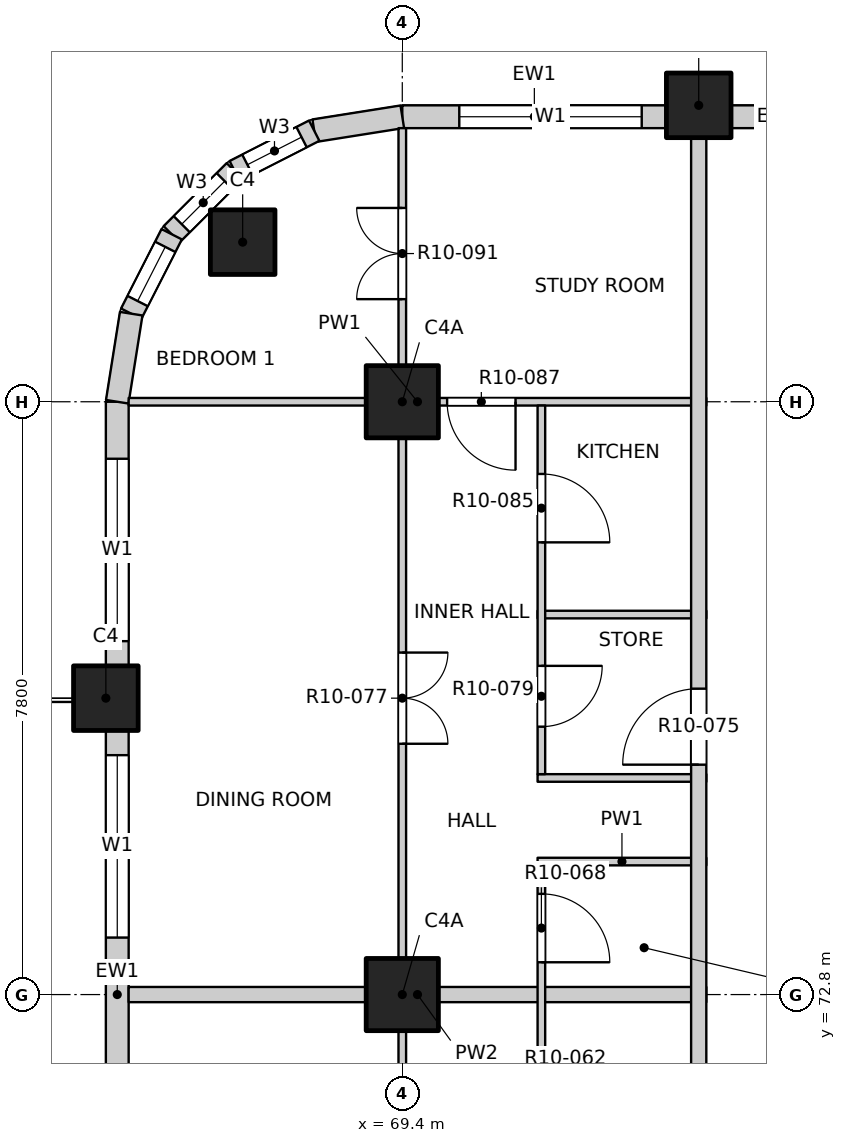
"""IFC4 building model, lengths in metres.
Left out: names, types, materials, properties, quantities, classifications, styles, units other than length and angle.
Written with IfcOpenShell. Run it as: python <this file> out.ifc"""

import sys

from ifc_helpers import new_model, si_unit, direction, frame, frame_2d, origin, origin_2d, place, context, subcontext, project, spatial, rectangle, extrude, element, fill, save


model = new_model("IFC4")
c1 = context("Model", 3, precision=1e-05, world=origin(), true_north=direction((0.0, 1.0)))
c2 = subcontext(c1, "Body", "Model", "MODEL_VIEW")
j1 = project(units=[si_unit("LENGTHUNIT", "METRE"), si_unit("PLANEANGLEUNIT", "RADIAN")], contexts=[c1])
p1 = place(None, origin())
s1 = spatial("IfcSite", under=j1, at=p1, CompositionType="ELEMENT")
p2 = place(p1, origin())
s2 = spatial("IfcBuilding", under=s1, at=p2, CompositionType="ELEMENT")
p3 = place(p2, frame((0.0, 0.0, 123.7)))
s3 = spatial("IfcBuildingStorey", under=s2, at=p3, CompositionType="ELEMENT", Elevation=123.7)
for number, where, z_axis, x_axis in (
    (1, (67.3, 82.7, -0.3), (0.0, 0.0, 1.0), (1.0, 0.0, 0.0)),
    (2, (73.3, 84.5, -0.3), (0.0, 0.0, 1.0), (1.0, 0.0, 0.0)),
    (3, (65.5, 76.7, -0.3), (0.0, 0.0, 1.0), (1.0, 0.0, 0.0)),
):
    element("IfcColumn", number, at=place(p3, frame(where, z_axis=z_axis, x_axis=x_axis)), inside=s3, PredefinedType="COLUMN", context=c2, shape_type="SweptSolid", body=[
        extrude(rectangle(XDim=0.85, YDim=0.85, at=origin_2d()), origin(), (0.0, 0.0, 1.0), 3.45),
    ])
for number, where, z_axis, x_axis in (
    (4, (69.4, 72.8, -0.3), (0.0, 0.0, 1.0), (1.0, 0.0, 0.0)),
    (5, (69.4, 80.6, -0.3), (0.0, 0.0, 1.0), (1.0, 0.0, 0.0)),
):
    element("IfcColumn", number, at=place(p3, frame(where, z_axis=z_axis, x_axis=x_axis)), inside=s3, PredefinedType="COLUMN", context=c2, shape_type="SweptSolid", body=[
        extrude(rectangle(XDim=0.95, YDim=0.95, at=origin_2d()), origin(), (0.0, 0.0, 1.0), 3.45),
    ])
p4 = place(p3, frame((69.4, 84.35, 0.0), z_axis=(0.0, 0.0, 1.0), x_axis=(1.0, 0.0, 0.0)))
e6 = element("IfcWall", 6, at=p4, inside=s3, PredefinedType="SOLIDWALL", context=c2, shape_type="SweptSolid", body=[
    extrude(rectangle(XDim=3.475, YDim=0.3, at=frame_2d((1.738, 0.0))), origin(), (0.0, 0.0, 1.0), 2.7),
])
p5 = place(p4, frame((0.75, 0.0, 0.9)))
e7 = element("IfcOpeningElement", 7, at=p5, cuts=e6, PredefinedType="OPENING", context=c2, shape_type="SweptSolid", body=[
    extrude(rectangle(XDim=2.4, YDim=1.8, at=frame_2d((1.2, 0.9))), frame((0.0, 0.16, 0.0), z_axis=(0.0, -1.0, 0.0), x_axis=(1.0, 0.0, 0.0)), (0.0, 0.0, 1.0), 0.32),
])
p6 = place(p3, frame((73.725, 84.35, 0.0), z_axis=(0.0, 0.0, 1.0), x_axis=(1.0, 0.0, 0.0)))
e8 = element("IfcWall", 8, at=p6, inside=s3, PredefinedType="SOLIDWALL", context=c2, shape_type="SweptSolid", body=[
    extrude(rectangle(XDim=1.25, YDim=0.3, at=frame_2d((0.625, 0.0))), origin(), (0.0, 0.0, 1.0), 2.7),
])
p7 = place(p3, frame((65.65, 69.325, 0.0), z_axis=(0.0, 0.0, 1.0), x_axis=(0.0, 1.0, 0.0)))
e9 = element("IfcWall", 9, at=p7, inside=s3, PredefinedType="SOLIDWALL", context=c2, shape_type="SweptSolid", body=[
    extrude(rectangle(XDim=6.95, YDim=0.3, at=frame_2d((3.475, 0.0))), origin(), (0.0, 0.0, 1.0), 2.7),
])
p8 = place(p7, frame((0.625, 0.0, 0.0)))
e10 = element("IfcOpeningElement", 10, at=p8, cuts=e9, PredefinedType="OPENING", context=c2, shape_type="SweptSolid", body=[
    extrude(rectangle(XDim=1.8, YDim=2.4, at=frame_2d((0.9, 1.2))), frame((0.0, 0.16, 0.0), z_axis=(0.0, -1.0, 0.0), x_axis=(1.0, 0.0, 0.0)), (0.0, 0.0, 1.0), 0.32),
])
p9 = place(p7, frame((4.225, 0.0, 0.9)))
e11 = element("IfcOpeningElement", 11, at=p9, cuts=e9, PredefinedType="OPENING", context=c2, shape_type="SweptSolid", body=[
    extrude(rectangle(XDim=2.4, YDim=1.8, at=frame_2d((1.2, 0.9))), frame((0.0, 0.16, 0.0), z_axis=(0.0, -1.0, 0.0), x_axis=(1.0, 0.0, 0.0)), (0.0, 0.0, 1.0), 0.32),
])
p10 = place(p3, frame((65.65, 77.125, 0.0), z_axis=(0.0, 0.0, 1.0), x_axis=(0.0, 1.0, 0.0)))
e12 = element("IfcWall", 12, at=p10, inside=s3, PredefinedType="SOLIDWALL", context=c2, shape_type="SweptSolid", body=[
    extrude(rectangle(XDim=3.475, YDim=0.3, at=frame_2d((1.738, 0.0))), origin(), (0.0, 0.0, 1.0), 2.7),
])
p11 = place(p10, frame((0.325, 0.0, 0.9)))
e13 = element("IfcOpeningElement", 13, at=p11, cuts=e12, PredefinedType="OPENING", context=c2, shape_type="SweptSolid", body=[
    extrude(rectangle(XDim=2.4, YDim=1.8, at=frame_2d((1.2, 0.9))), frame((0.0, 0.16, 0.0), z_axis=(0.0, -1.0, 0.0), x_axis=(1.0, 0.0, 0.0)), (0.0, 0.0, 1.0), 0.32),
])
p12 = place(p3, frame((69.4, 84.35, 0.0), z_axis=(0.0, 0.0, 1.0), x_axis=(-0.987678452879, -0.156496880861, 0.0)))
e14 = element("IfcWall", 14, at=p12, inside=s3, PredefinedType="SOLIDWALL", context=c2, shape_type="SweptSolid", body=[
    extrude(rectangle(XDim=1.173, YDim=0.3, at=frame_2d((0.586, 0.0))), origin(), (0.0, 0.0, 1.0), 2.7),
])
p13 = place(p3, frame((68.241, 84.167, 0.0), z_axis=(0.0, 0.0, 1.0), x_axis=(-0.890988677504, -0.454025524128, 0.0)))
e15 = element("IfcWall", 15, at=p13, inside=s3, PredefinedType="SOLIDWALL", context=c2, shape_type="SweptSolid", body=[
    extrude(rectangle(XDim=1.173, YDim=0.3, at=frame_2d((0.587, 0.0))), origin(), (0.0, 0.0, 1.0), 2.7),
])
p14 = place(p13, frame((0.187, 0.0, 0.9)))
e16 = element("IfcOpeningElement", 16, at=p14, cuts=e15, PredefinedType="OPENING", context=c2, shape_type="SweptSolid", body=[
    extrude(rectangle(XDim=0.8, YDim=1.2, at=frame_2d((0.4, 0.6))), frame((0.0, 0.16, 0.0), z_axis=(0.0, -1.0, 0.0), x_axis=(1.0, 0.0, 0.0)), (0.0, 0.0, 1.0), 0.32),
])
p15 = place(p3, frame((67.196, 83.634, 0.0), z_axis=(0.0, 0.0, 1.0), x_axis=(-0.707106781187, -0.707106781187, 0.0)))
e17 = element("IfcWall", 17, at=p15, inside=s3, PredefinedType="SOLIDWALL", context=c2, shape_type="SweptSolid", body=[
    extrude(rectangle(XDim=1.173, YDim=0.3, at=frame_2d((0.586, 0.0))), origin(), (0.0, 0.0, 1.0), 2.7),
])
p16 = place(p15, frame((0.187, 0.0, 0.9)))
e18 = element("IfcOpeningElement", 18, at=p16, cuts=e17, PredefinedType="OPENING", context=c2, shape_type="SweptSolid", body=[
    extrude(rectangle(XDim=0.8, YDim=1.2, at=frame_2d((0.4, 0.6))), frame((0.0, 0.16, 0.0), z_axis=(0.0, -1.0, 0.0), x_axis=(1.0, 0.0, 0.0)), (0.0, 0.0, 1.0), 0.32),
])
p17 = place(p3, frame((66.366, 82.804, 0.0), z_axis=(0.0, 0.0, 1.0), x_axis=(-0.454025524128, -0.890988677504, 0.0)))
e19 = element("IfcWall", 19, at=p17, inside=s3, PredefinedType="SOLIDWALL", context=c2, shape_type="SweptSolid", body=[
    extrude(rectangle(XDim=1.173, YDim=0.3, at=frame_2d((0.587, 0.0))), origin(), (0.0, 0.0, 1.0), 2.7),
])
p18 = place(p17, frame((0.187, 0.0, 0.9)))
e20 = element("IfcOpeningElement", 20, at=p18, cuts=e19, PredefinedType="OPENING", context=c2, shape_type="SweptSolid", body=[
    extrude(rectangle(XDim=0.8, YDim=1.2, at=frame_2d((0.4, 0.6))), frame((0.0, 0.16, 0.0), z_axis=(0.0, -1.0, 0.0), x_axis=(1.0, 0.0, 0.0)), (0.0, 0.0, 1.0), 0.32),
])
p19 = place(p3, frame((65.833, 81.759, 0.0), z_axis=(0.0, 0.0, 1.0), x_axis=(-0.156496880861, -0.987678452879, 0.0)))
e21 = element("IfcWall", 21, at=p19, inside=s3, PredefinedType="SOLIDWALL", context=c2, shape_type="SweptSolid", body=[
    extrude(rectangle(XDim=1.173, YDim=0.3, at=frame_2d((0.586, 0.0))), origin(), (0.0, 0.0, 1.0), 2.7),
])
p20 = place(p3, frame((65.8, 72.8, 0.0), z_axis=(0.0, 0.0, 1.0), x_axis=(1.0, 0.0, 0.0)))
e22 = element("IfcWall", 22, at=p20, inside=s3, PredefinedType="PARTITIONING", context=c2, shape_type="SweptSolid", body=[
    extrude(rectangle(XDim=7.6, YDim=0.2, at=frame_2d((3.8, 0.0))), origin(), (0.0, 0.0, 1.0), 3.15),
])
for number, where, z_axis, x_axis in (
    (23, (71.18, 74.55, 0.0), (0.0, 0.0, 1.0), (1.0, 0.0, 0.0)),
    (24, (71.18, 75.65, 0.0), (0.0, 0.0, 1.0), (1.0, 0.0, 0.0)),
    (25, (71.18, 77.8, 0.0), (0.0, 0.0, 1.0), (1.0, 0.0, 0.0)),
):
    element("IfcWall", number, at=place(p3, frame(where, z_axis=z_axis, x_axis=x_axis)), inside=s3, PredefinedType="PARTITIONING", context=c2, shape_type="SweptSolid", body=[
        extrude(rectangle(XDim=2.22, YDim=0.1, at=frame_2d((1.11, 0.0))), origin(), (0.0, 0.0, 1.0), 3.15),
    ])
p21 = place(p3, frame((65.8, 80.6, 0.0), z_axis=(0.0, 0.0, 1.0), x_axis=(1.0, 0.0, 0.0)))
e26 = element("IfcWall", 26, at=p21, inside=s3, PredefinedType="PARTITIONING", context=c2, shape_type="SweptSolid", body=[
    extrude(rectangle(XDim=7.6, YDim=0.1, at=frame_2d((3.8, 0.0))), origin(), (0.0, 0.0, 1.0), 3.15),
])
p22 = place(p21, frame((4.19, 0.0, 0.0)))
e27 = element("IfcOpeningElement", 27, at=p22, cuts=e26, PredefinedType="OPENING", context=c2, shape_type="SweptSolid", body=[
    extrude(rectangle(XDim=0.9, YDim=2.1, at=frame_2d((0.45, 1.05))), frame((0.0, 0.06, 0.0), z_axis=(0.0, -1.0, 0.0), x_axis=(1.0, 0.0, 0.0)), (0.0, 0.0, 1.0), 0.12),
])
p23 = place(p3, frame((69.4, 45.8, 0.0), z_axis=(0.0, 0.0, 1.0), x_axis=(0.0, 1.0, 0.0)))
e28 = element("IfcWall", 28, at=p23, inside=s3, PredefinedType="PARTITIONING", context=c2, shape_type="SweptSolid", body=[
    extrude(rectangle(XDim=38.4, YDim=0.1, at=frame_2d((19.2, 0.0))), origin(), (0.0, 0.0, 1.0), 3.15),
])
p24 = place(p23, frame((1.05, 0.0, 0.0)))
e29 = element("IfcOpeningElement", 29, at=p24, cuts=e28, PredefinedType="OPENING", context=c2, shape_type="SweptSolid", body=[
    extrude(rectangle(XDim=1.2, YDim=2.1, at=frame_2d((0.6, 1.05))), frame((0.0, 0.06, 0.0), z_axis=(0.0, -1.0, 0.0), x_axis=(1.0, 0.0, 0.0)), (0.0, 0.0, 1.0), 0.12),
])
p25 = place(p23, frame((5.1, 0.0, 0.0)))
e30 = element("IfcOpeningElement", 30, at=p25, cuts=e28, PredefinedType="OPENING", context=c2, shape_type="SweptSolid", body=[
    extrude(rectangle(XDim=0.9, YDim=2.1, at=frame_2d((0.45, 1.05))), frame((0.0, 0.06, 0.0), z_axis=(0.0, -1.0, 0.0), x_axis=(1.0, 0.0, 0.0)), (0.0, 0.0, 1.0), 0.12),
])
p26 = place(p23, frame((9.0, 0.0, 0.0)))
e31 = element("IfcOpeningElement", 31, at=p26, cuts=e28, PredefinedType="OPENING", context=c2, shape_type="SweptSolid", body=[
    extrude(rectangle(XDim=0.9, YDim=2.1, at=frame_2d((0.45, 1.05))), frame((0.0, 0.06, 0.0), z_axis=(0.0, -1.0, 0.0), x_axis=(1.0, 0.0, 0.0)), (0.0, 0.0, 1.0), 0.12),
])
p27 = place(p23, frame((12.9, 0.0, 0.0)))
e32 = element("IfcOpeningElement", 32, at=p27, cuts=e28, PredefinedType="OPENING", context=c2, shape_type="SweptSolid", body=[
    extrude(rectangle(XDim=0.9, YDim=2.1, at=frame_2d((0.45, 1.05))), frame((0.0, 0.06, 0.0), z_axis=(0.0, -1.0, 0.0), x_axis=(1.0, 0.0, 0.0)), (0.0, 0.0, 1.0), 0.12),
])
p28 = place(p23, frame((19.775, 0.0, 0.0)))
e33 = element("IfcOpeningElement", 33, at=p28, cuts=e28, PredefinedType="OPENING", context=c2, shape_type="SweptSolid", body=[
    extrude(rectangle(XDim=1.2, YDim=2.1, at=frame_2d((0.6, 1.05))), frame((0.0, 0.06, 0.0), z_axis=(0.0, -1.0, 0.0), x_axis=(1.0, 0.0, 0.0)), (0.0, 0.0, 1.0), 0.12),
])
p29 = place(p23, frame((24.6, 0.0, 0.0)))
e34 = element("IfcOpeningElement", 34, at=p29, cuts=e28, PredefinedType="OPENING", context=c2, shape_type="SweptSolid", body=[
    extrude(rectangle(XDim=0.9, YDim=2.1, at=frame_2d((0.45, 1.05))), frame((0.0, 0.06, 0.0), z_axis=(0.0, -1.0, 0.0), x_axis=(1.0, 0.0, 0.0)), (0.0, 0.0, 1.0), 0.12),
])
p30 = place(p23, frame((30.3, 0.0, 0.0)))
e35 = element("IfcOpeningElement", 35, at=p30, cuts=e28, PredefinedType="OPENING", context=c2, shape_type="SweptSolid", body=[
    extrude(rectangle(XDim=1.2, YDim=2.1, at=frame_2d((0.6, 1.05))), frame((0.0, 0.06, 0.0), z_axis=(0.0, -1.0, 0.0), x_axis=(1.0, 0.0, 0.0)), (0.0, 0.0, 1.0), 0.12),
])
p31 = place(p23, frame((36.15, 0.0, 0.0)))
e36 = element("IfcOpeningElement", 36, at=p31, cuts=e28, PredefinedType="OPENING", context=c2, shape_type="SweptSolid", body=[
    extrude(rectangle(XDim=1.2, YDim=2.1, at=frame_2d((0.6, 1.05))), frame((0.0, 0.06, 0.0), z_axis=(0.0, -1.0, 0.0), x_axis=(1.0, 0.0, 0.0)), (0.0, 0.0, 1.0), 0.12),
])
p32 = place(p3, frame((71.23, 67.45, 0.0), z_axis=(0.0, 0.0, 1.0), x_axis=(0.0, 1.0, 0.0)))
e37 = element("IfcWall", 37, at=p32, inside=s3, PredefinedType="PARTITIONING", context=c2, shape_type="SweptSolid", body=[
    extrude(rectangle(XDim=7.05, YDim=0.1, at=frame_2d((3.525, 0.0))), origin(), (0.0, 0.0, 1.0), 3.15),
])
p33 = place(p32, frame((0.7, 0.0, 0.0)))
e38 = element("IfcOpeningElement", 38, at=p33, cuts=e37, PredefinedType="OPENING", context=c2, shape_type="SweptSolid", body=[
    extrude(rectangle(XDim=0.8, YDim=2.1, at=frame_2d((0.4, 1.05))), frame((0.0, 0.06, 0.0), z_axis=(0.0, -1.0, 0.0), x_axis=(1.0, 0.0, 0.0)), (0.0, 0.0, 1.0), 0.12),
])
p34 = place(p32, frame((3.35, 0.0, 0.0)))
e39 = element("IfcOpeningElement", 39, at=p34, cuts=e37, PredefinedType="OPENING", context=c2, shape_type="SweptSolid", body=[
    extrude(rectangle(XDim=0.9, YDim=2.1, at=frame_2d((0.45, 1.05))), frame((0.0, 0.06, 0.0), z_axis=(0.0, -1.0, 0.0), x_axis=(1.0, 0.0, 0.0)), (0.0, 0.0, 1.0), 0.12),
])
p35 = place(p32, frame((5.775, 0.0, 0.0)))
e40 = element("IfcOpeningElement", 40, at=p35, cuts=e37, PredefinedType="OPENING", context=c2, shape_type="SweptSolid", body=[
    extrude(rectangle(XDim=0.9, YDim=2.1, at=frame_2d((0.45, 1.05))), frame((0.0, 0.06, 0.0), z_axis=(0.0, -1.0, 0.0), x_axis=(1.0, 0.0, 0.0)), (0.0, 0.0, 1.0), 0.12),
])
p36 = place(p3, frame((71.23, 75.7, 0.0), z_axis=(0.0, 0.0, 1.0), x_axis=(0.0, 1.0, 0.0)))
e41 = element("IfcWall", 41, at=p36, inside=s3, PredefinedType="PARTITIONING", context=c2, shape_type="SweptSolid", body=[
    extrude(rectangle(XDim=4.85, YDim=0.1, at=frame_2d((2.425, 0.0))), origin(), (0.0, 0.0, 1.0), 3.15),
])
p37 = place(p36, frame((0.625, 0.0, 0.0)))
e42 = element("IfcOpeningElement", 42, at=p37, cuts=e41, PredefinedType="OPENING", context=c2, shape_type="SweptSolid", body=[
    extrude(rectangle(XDim=0.8, YDim=2.1, at=frame_2d((0.4, 1.05))), frame((0.0, 0.06, 0.0), z_axis=(0.0, -1.0, 0.0), x_axis=(1.0, 0.0, 0.0)), (0.0, 0.0, 1.0), 0.12),
])
p38 = place(p36, frame((3.05, 0.0, 0.0)))
e43 = element("IfcOpeningElement", 43, at=p38, cuts=e41, PredefinedType="OPENING", context=c2, shape_type="SweptSolid", body=[
    extrude(rectangle(XDim=0.9, YDim=2.1, at=frame_2d((0.45, 1.05))), frame((0.0, 0.06, 0.0), z_axis=(0.0, -1.0, 0.0), x_axis=(1.0, 0.0, 0.0)), (0.0, 0.0, 1.0), 0.12),
])
p39 = place(p3, frame((73.3, 53.4, 0.0), z_axis=(0.0, 0.0, 1.0), x_axis=(0.0, 1.0, 0.0)))
e44 = element("IfcWall", 44, at=p39, inside=s3, PredefinedType="PARTITIONING", context=c2, shape_type="SweptSolid", body=[
    extrude(rectangle(XDim=30.8, YDim=0.2, at=frame_2d((15.4, 0.0))), origin(), (0.0, 0.0, 1.0), 3.15),
])
p40 = place(p39, frame((3.175, 0.0, 0.0)))
e45 = element("IfcOpeningElement", 45, at=p40, cuts=e44, PredefinedType="OPENING", context=c2, shape_type="SweptSolid", body=[
    extrude(rectangle(XDim=1.0, YDim=2.1, at=frame_2d((0.5, 1.05))), frame((0.0, 0.11, 0.0), z_axis=(0.0, -1.0, 0.0), x_axis=(1.0, 0.0, 0.0)), (0.0, 0.0, 1.0), 0.22),
])
p41 = place(p39, frame((14.175, 0.0, 0.0)))
e46 = element("IfcOpeningElement", 46, at=p41, cuts=e44, PredefinedType="OPENING", context=c2, shape_type="SweptSolid", body=[
    extrude(rectangle(XDim=1.0, YDim=2.1, at=frame_2d((0.5, 1.05))), frame((0.0, 0.11, 0.0), z_axis=(0.0, -1.0, 0.0), x_axis=(1.0, 0.0, 0.0)), (0.0, 0.0, 1.0), 0.22),
])
p42 = place(p39, frame((22.425, 0.0, 0.0)))
e47 = element("IfcOpeningElement", 47, at=p42, cuts=e44, PredefinedType="OPENING", context=c2, shape_type="SweptSolid", body=[
    extrude(rectangle(XDim=1.0, YDim=2.1, at=frame_2d((0.5, 1.05))), frame((0.0, 0.11, 0.0), z_axis=(0.0, -1.0, 0.0), x_axis=(1.0, 0.0, 0.0)), (0.0, 0.0, 1.0), 0.22),
])
p43 = place(p5, origin())
e48 = element("IfcWindow", 48, at=p43, inside=s3, PartitioningType="DOUBLE_PANEL_VERTICAL", PredefinedType="WINDOW", context=c2, shape_type="SweptSolid", body=[
    extrude(rectangle(XDim=2.4, YDim=1.8, at=frame_2d((1.2, 0.9))), frame((0.0, 0.03, 0.0), z_axis=(0.0, -1.0, 0.0), x_axis=(1.0, 0.0, 0.0)), (0.0, 0.0, 1.0), 0.06),
])
fill(e7, e48)
p44 = place(p9, origin())
e49 = element("IfcWindow", 49, at=p44, inside=s3, PartitioningType="DOUBLE_PANEL_VERTICAL", PredefinedType="WINDOW", context=c2, shape_type="SweptSolid", body=[
    extrude(rectangle(XDim=2.4, YDim=1.8, at=frame_2d((1.2, 0.9))), frame((0.0, 0.03, 0.0), z_axis=(0.0, -1.0, 0.0), x_axis=(1.0, 0.0, 0.0)), (0.0, 0.0, 1.0), 0.06),
])
fill(e11, e49)
p45 = place(p11, origin())
e50 = element("IfcWindow", 50, at=p45, inside=s3, PartitioningType="DOUBLE_PANEL_VERTICAL", PredefinedType="WINDOW", context=c2, shape_type="SweptSolid", body=[
    extrude(rectangle(XDim=2.4, YDim=1.8, at=frame_2d((1.2, 0.9))), frame((0.0, 0.03, 0.0), z_axis=(0.0, -1.0, 0.0), x_axis=(1.0, 0.0, 0.0)), (0.0, 0.0, 1.0), 0.06),
])
fill(e13, e50)
p46 = place(p14, origin())
e51 = element("IfcWindow", 51, at=p46, inside=s3, PartitioningType="SINGLE_PANEL", PredefinedType="WINDOW", context=c2, shape_type="SweptSolid", body=[
    extrude(rectangle(XDim=0.8, YDim=1.2, at=frame_2d((0.4, 0.6))), frame((0.0, 0.03, 0.0), z_axis=(0.0, -1.0, 0.0), x_axis=(1.0, 0.0, 0.0)), (0.0, 0.0, 1.0), 0.06),
])
fill(e16, e51)
p47 = place(p16, origin())
e52 = element("IfcWindow", 52, at=p47, inside=s3, PartitioningType="SINGLE_PANEL", PredefinedType="WINDOW", context=c2, shape_type="SweptSolid", body=[
    extrude(rectangle(XDim=0.8, YDim=1.2, at=frame_2d((0.4, 0.6))), frame((0.0, 0.03, 0.0), z_axis=(0.0, -1.0, 0.0), x_axis=(1.0, 0.0, 0.0)), (0.0, 0.0, 1.0), 0.06),
])
fill(e18, e52)
p48 = place(p18, origin())
e53 = element("IfcWindow", 53, at=p48, inside=s3, PartitioningType="SINGLE_PANEL", PredefinedType="WINDOW", context=c2, shape_type="SweptSolid", body=[
    extrude(rectangle(XDim=0.8, YDim=1.2, at=frame_2d((0.4, 0.6))), frame((0.0, 0.03, 0.0), z_axis=(0.0, -1.0, 0.0), x_axis=(1.0, 0.0, 0.0)), (0.0, 0.0, 1.0), 0.06),
])
fill(e20, e53)
p49 = place(p35, origin())
e54 = element("IfcDoor", 54, at=p49, inside=s3, OperationType="SINGLE_SWING_RIGHT", PredefinedType="DOOR", context=c2, shape_type="SweptSolid", body=[
    extrude(rectangle(XDim=0.9, YDim=2.1, at=frame_2d((0.45, 1.05))), frame((0.0, 0.025, 0.0), z_axis=(0.0, -1.0, 0.0), x_axis=(1.0, 0.0, 0.0)), (0.0, 0.0, 1.0), 0.05),
])
fill(e40, e54)
p50 = place(p42, origin())
e55 = element("IfcDoor", 55, at=p50, inside=s3, OperationType="SINGLE_SWING_RIGHT", PredefinedType="DOOR", context=c2, shape_type="SweptSolid", body=[
    extrude(rectangle(XDim=1.0, YDim=2.1, at=frame_2d((0.5, 1.05))), frame((0.0, 0.025, 0.0), z_axis=(0.0, -1.0, 0.0), x_axis=(1.0, 0.0, 0.0)), (0.0, 0.0, 1.0), 0.05),
])
fill(e47, e55)
p51 = place(p30, origin())
e56 = element("IfcDoor", 56, at=p51, inside=s3, OperationType="DOUBLE_DOOR_SINGLE_SWING", PredefinedType="DOOR", context=c2, shape_type="SweptSolid", body=[
    extrude(rectangle(XDim=1.2, YDim=2.1, at=frame_2d((0.6, 1.05))), frame((0.0, 0.025, 0.0), z_axis=(0.0, -1.0, 0.0), x_axis=(1.0, 0.0, 0.0)), (0.0, 0.0, 1.0), 0.05),
])
fill(e35, e56)
p52 = place(p37, origin())
e57 = element("IfcDoor", 57, at=p52, inside=s3, OperationType="SINGLE_SWING_LEFT", PredefinedType="DOOR", context=c2, shape_type="SweptSolid", body=[
    extrude(rectangle(XDim=0.8, YDim=2.1, at=frame_2d((0.4, 1.05))), frame((0.0, 0.025, 0.0), z_axis=(0.0, -1.0, 0.0), x_axis=(1.0, 0.0, 0.0)), (0.0, 0.0, 1.0), 0.05),
])
fill(e42, e57)
p53 = place(p38, origin())
e58 = element("IfcDoor", 58, at=p53, inside=s3, OperationType="SINGLE_SWING_RIGHT", PredefinedType="DOOR", context=c2, shape_type="SweptSolid", body=[
    extrude(rectangle(XDim=0.9, YDim=2.1, at=frame_2d((0.45, 1.05))), frame((0.0, 0.025, 0.0), z_axis=(0.0, -1.0, 0.0), x_axis=(1.0, 0.0, 0.0)), (0.0, 0.0, 1.0), 0.05),
])
fill(e43, e58)
p54 = place(p22, origin())
e59 = element("IfcDoor", 59, at=p54, inside=s3, OperationType="SINGLE_SWING_LEFT", PredefinedType="DOOR", context=c2, shape_type="SweptSolid", body=[
    extrude(rectangle(XDim=0.9, YDim=2.1, at=frame_2d((0.45, 1.05))), frame((0.0, 0.025, 0.0), z_axis=(0.0, -1.0, 0.0), x_axis=(1.0, 0.0, 0.0)), (0.0, 0.0, 1.0), 0.05),
])
fill(e27, e59)
p55 = place(p31, origin())
e60 = element("IfcDoor", 60, at=p55, inside=s3, OperationType="DOUBLE_DOOR_SINGLE_SWING", PredefinedType="DOOR", context=c2, shape_type="SweptSolid", body=[
    extrude(rectangle(XDim=1.2, YDim=2.1, at=frame_2d((0.6, 1.05))), frame((0.0, 0.025, 0.0), z_axis=(0.0, -1.0, 0.0), x_axis=(1.0, 0.0, 0.0)), (0.0, 0.0, 1.0), 0.05),
])
fill(e36, e60)
save(model, sys.argv[1])
